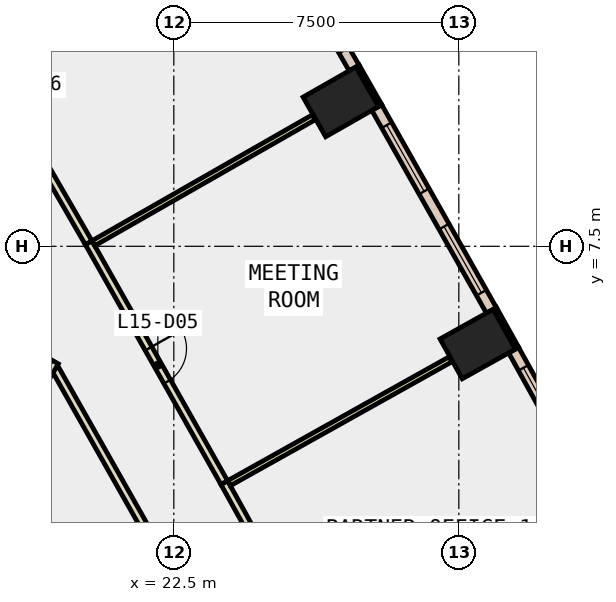
"""IFC4 building model, lengths in metres.
Left out: names, types, materials, properties, quantities, classifications, styles, units other than length and angle.
Written with IfcOpenShell. Run it as: python <this file> out.ifc"""

import sys

from ifc_helpers import new_model, si_unit, direction, frame, frame_2d, origin, origin_2d, place, context, subcontext, project, spatial, rectangle, extrude, element, fill, save


model = new_model("IFC4")
c1 = context("Model", 3, precision=1e-05, world=origin(), true_north=direction((0.0, 1.0)))
c2 = subcontext(c1, "Body", "Model", "MODEL_VIEW")
j1 = project(units=[si_unit("LENGTHUNIT", "METRE"), si_unit("PLANEANGLEUNIT", "RADIAN")], contexts=[c1])
p1 = place(None, origin())
s1 = spatial("IfcSite", under=j1, at=p1, CompositionType="ELEMENT")
p2 = place(p1, origin())
s2 = spatial("IfcBuilding", under=s1, at=p2, CompositionType="ELEMENT")
p3 = place(p2, frame((0.0, 0.0, 72.8)))
s3 = spatial("IfcBuildingStorey", under=s2, at=p3, CompositionType="ELEMENT", Elevation=72.8)
for number, where, z_axis, x_axis in (
    (1, (30.497, 4.928, -0.4), (0.0, 0.0, 1.0), (-0.487, 0.873, 0.0)),
    (2, (26.894, 11.301, -0.4), (0.0, 0.0, 1.0), (-0.496, 0.869, 0.0)),
):
    element("IfcColumn", number, at=place(p3, frame(where, z_axis=z_axis, x_axis=x_axis)), inside=s3, PredefinedType="COLUMN", context=c2, shape_type="SweptSolid", body=[
        extrude(rectangle(XDim=1.2, YDim=1.6, at=origin_2d()), origin(), (0.0, 0.0, 1.0), 4.2),
    ])
p4 = place(p3, frame((31.531, 4.818, 0.0), z_axis=(0.0, 0.0, 1.0), x_axis=(-0.486817526853, 0.873503689488, 0.0)))
e3 = element("IfcWall", 3, at=p4, inside=s3, PredefinedType="STANDARD", context=c2, shape_type="SweptSolid", body=[
    extrude(rectangle(XDim=1.2, YDim=0.1, at=frame_2d((0.6, 0.0))), origin(), (0.0, 0.0, 1.0), 3.8),
])
p5 = place(p3, frame((27.93, 11.201, 0.0), z_axis=(0.0, 0.0, 1.0), x_axis=(-0.495854054996, 0.868405870629, 0.0)))
e4 = element("IfcWall", 4, at=p5, inside=s3, PredefinedType="STANDARD", context=c2, shape_type="SweptSolid", body=[
    extrude(rectangle(XDim=1.2, YDim=0.1, at=frame_2d((0.6, 0.0))), origin(), (0.0, 0.0, 1.0), 3.8),
])
p6 = place(p3, frame((34.409, -0.595, 0.0), z_axis=(0.0, 0.0, 1.0), x_axis=(-0.484025698618, 0.875053782963, 0.0)))
e5 = element("IfcWall", 5, at=p6, inside=s3, PredefinedType="STANDARD", context=c2, shape_type="SweptSolid", body=[
    extrude(rectangle(XDim=6.13, YDim=0.3, at=frame_2d((3.065, 0.0))), origin(), (0.0, 0.0, 1.0), 3.8),
])
p7 = place(p6, frame((0.532, 0.0, 0.9)))
e6 = element("IfcOpeningElement", 6, at=p7, cuts=e5, PredefinedType="OPENING", context=c2, shape_type="SweptSolid", body=[
    extrude(rectangle(XDim=2.0, YDim=2.6, at=frame_2d((1.0, 1.3))), frame((0.0, 0.16, 0.0), z_axis=(0.0, -1.0, 0.0), x_axis=(1.0, 0.0, 0.0)), (0.0, 0.0, 1.0), 0.32),
])
p8 = place(p6, frame((3.597, 0.0, 0.9)))
e7 = element("IfcOpeningElement", 7, at=p8, cuts=e5, PredefinedType="OPENING", context=c2, shape_type="SweptSolid", body=[
    extrude(rectangle(XDim=2.0, YDim=2.6, at=frame_2d((1.0, 1.3))), frame((0.0, 0.16, 0.0), z_axis=(0.0, -1.0, 0.0), x_axis=(1.0, 0.0, 0.0)), (0.0, 0.0, 1.0), 0.32),
])
p9 = place(p3, frame((30.857, 5.814, 0.0), z_axis=(0.0, 0.0, 1.0), x_axis=(-0.492097935349, 0.870539845168, 0.0)))
e8 = element("IfcWall", 8, at=p9, inside=s3, PredefinedType="STANDARD", context=c2, shape_type="SweptSolid", body=[
    extrude(rectangle(XDim=6.131, YDim=0.3, at=frame_2d((3.065, 0.0))), origin(), (0.0, 0.0, 1.0), 3.8),
])
p10 = place(p9, frame((0.533, 0.0, 0.9)))
e9 = element("IfcOpeningElement", 9, at=p10, cuts=e8, PredefinedType="OPENING", context=c2, shape_type="SweptSolid", body=[
    extrude(rectangle(XDim=2.0, YDim=2.6, at=frame_2d((1.0, 1.3))), frame((0.0, 0.16, 0.0), z_axis=(0.0, -1.0, 0.0), x_axis=(1.0, 0.0, 0.0)), (0.0, 0.0, 1.0), 0.32),
])
p11 = place(p9, frame((3.598, 0.0, 0.9)))
e10 = element("IfcOpeningElement", 10, at=p11, cuts=e8, PredefinedType="OPENING", context=c2, shape_type="SweptSolid", body=[
    extrude(rectangle(XDim=2.0, YDim=2.6, at=frame_2d((1.0, 1.3))), frame((0.0, 0.16, 0.0), z_axis=(0.0, -1.0, 0.0), x_axis=(1.0, 0.0, 0.0)), (0.0, 0.0, 1.0), 0.32),
])
p12 = place(p3, frame((27.246, 12.191, 0.0), z_axis=(0.0, 0.0, 1.0), x_axis=(-0.499998239139, 0.866026420416, 0.0)))
e11 = element("IfcWall", 11, at=p12, inside=s3, PredefinedType="STANDARD", context=c2, shape_type="SweptSolid", body=[
    extrude(rectangle(XDim=6.13, YDim=0.3, at=frame_2d((3.065, 0.0))), origin(), (0.0, 0.0, 1.0), 3.8),
])
p13 = place(p12, frame((0.533, 0.0, 0.9)))
e12 = element("IfcOpeningElement", 12, at=p13, cuts=e11, PredefinedType="OPENING", context=c2, shape_type="SweptSolid", body=[
    extrude(rectangle(XDim=2.0, YDim=2.6, at=frame_2d((1.0, 1.3))), frame((0.0, 0.16, 0.0), z_axis=(0.0, -1.0, 0.0), x_axis=(1.0, 0.0, 0.0)), (0.0, 0.0, 1.0), 0.32),
])
p14 = place(p12, frame((3.598, 0.0, 0.9)))
e13 = element("IfcOpeningElement", 13, at=p14, cuts=e11, PredefinedType="OPENING", context=c2, shape_type="SweptSolid", body=[
    extrude(rectangle(XDim=2.0, YDim=2.6, at=frame_2d((1.0, 1.3))), frame((0.0, 0.16, 0.0), z_axis=(0.0, -1.0, 0.0), x_axis=(1.0, 0.0, 0.0)), (0.0, 0.0, 1.0), 0.32),
])
p15 = place(p3, frame((21.77, 0.046, 0.0), z_axis=(0.0, 0.0, 1.0), x_axis=(-0.492148137455, 0.870511465059, 0.0)))
e14 = element("IfcWall", 14, at=p15, inside=s3, PredefinedType="PARTITIONING", context=c2, shape_type="SweptSolid", body=[
    extrude(rectangle(XDim=4.868, YDim=0.2, at=frame_2d((2.434, 0.0))), origin(), (0.0, 0.0, 1.0), 3.8),
])
p16 = place(p3, frame((23.828, 1.283, 0.0), z_axis=(0.0, 0.0, 1.0), x_axis=(0.484064127728, -0.875032525251, 0.0)))
e15 = element("IfcWall", 15, at=p16, inside=s3, PredefinedType="PARTITIONING", context=c2, shape_type="SweptSolid", body=[
    extrude(rectangle(XDim=7.251, YDim=0.2, at=frame_2d((3.625, 0.0))), origin(), (0.0, 0.0, 1.0), 3.8),
])
p17 = place(p16, frame((3.201, 0.0, 0.0)))
e16 = element("IfcOpeningElement", 16, at=p17, cuts=e15, PredefinedType="OPENING", context=c2, shape_type="SweptSolid", body=[
    extrude(rectangle(XDim=1.0, YDim=2.1, at=frame_2d((0.5, 1.05))), frame((0.0, 0.11, 0.0), z_axis=(0.0, -1.0, 0.0), x_axis=(1.0, 0.0, 0.0)), (0.0, 0.0, 1.0), 0.22),
])
p18 = place(p3, frame((20.259, 7.596, 0.0), z_axis=(0.0, 0.0, 1.0), x_axis=(0.492021755503, -0.870582903641, 0.0)))
e17 = element("IfcWall", 17, at=p18, inside=s3, PredefinedType="PARTITIONING", context=c2, shape_type="SweptSolid", body=[
    extrude(rectangle(XDim=7.251, YDim=0.2, at=frame_2d((3.626, 0.0))), origin(), (0.0, 0.0, 1.0), 3.8),
])
p19 = place(p18, frame((3.201, 0.0, 0.0)))
e18 = element("IfcOpeningElement", 18, at=p19, cuts=e17, PredefinedType="OPENING", context=c2, shape_type="SweptSolid", body=[
    extrude(rectangle(XDim=1.0, YDim=2.1, at=frame_2d((0.5, 1.05))), frame((0.0, 0.11, 0.0), z_axis=(0.0, -1.0, 0.0), x_axis=(1.0, 0.0, 0.0)), (0.0, 0.0, 1.0), 0.22),
])
p20 = place(p3, frame((16.669, 13.811, 0.0), z_axis=(0.0, 0.0, 1.0), x_axis=(0.500027672765, -0.866009426316, 0.0)))
e19 = element("IfcWall", 19, at=p20, inside=s3, PredefinedType="PARTITIONING", context=c2, shape_type="SweptSolid", body=[
    extrude(rectangle(XDim=7.178, YDim=0.2, at=frame_2d((3.589, 0.0))), origin(), (0.0, 0.0, 1.0), 3.8),
])
p21 = place(p20, frame((3.164, 0.0, 0.0)))
e20 = element("IfcOpeningElement", 20, at=p21, cuts=e19, PredefinedType="OPENING", context=c2, shape_type="SweptSolid", body=[
    extrude(rectangle(XDim=1.0, YDim=2.1, at=frame_2d((0.5, 1.05))), frame((0.0, 0.11, 0.0), z_axis=(0.0, -1.0, 0.0), x_axis=(1.0, 0.0, 0.0)), (0.0, 0.0, 1.0), 0.22),
])
p22 = place(p3, frame((19.374, 4.458, 0.0), z_axis=(0.0, 0.0, 1.0), x_axis=(-0.499973880856, -0.866040483154, 0.0)))
e21 = element("IfcWall", 21, at=p22, inside=s3, PredefinedType="PARTITIONING", context=c2, shape_type="SweptSolid", body=[
    extrude(rectangle(XDim=13.113, YDim=0.2, at=frame_2d((6.556, 0.0))), origin(), (0.0, 0.0, 1.0), 3.8),
])
p23 = place(p3, frame((23.951, 1.266, 0.0), z_axis=(0.0, 0.0, 1.0), x_axis=(0.872786908026, 0.488101437385, 0.0)))
e22 = element("IfcWall", 22, at=p23, inside=s3, PredefinedType="PARTITIONING", context=c2, shape_type="SweptSolid", body=[
    extrude(rectangle(XDim=6.681, YDim=0.15, at=frame_2d((3.34, 0.0))), origin(), (0.0, 0.0, 1.0), 3.8),
])
p24 = place(p3, frame((20.382, 7.58, 0.0), z_axis=(0.0, 0.0, 1.0), x_axis=(0.868256636797, 0.496115321935, 0.0)))
e23 = element("IfcWall", 23, at=p24, inside=s3, PredefinedType="PARTITIONING", context=c2, shape_type="SweptSolid", body=[
    extrude(rectangle(XDim=6.68, YDim=0.15, at=frame_2d((3.34, 0.0))), origin(), (0.0, 0.0, 1.0), 3.8),
])
p25 = place(p8, origin())
e24 = element("IfcWindow", 24, at=p25, inside=s3, PartitioningType="SINGLE_PANEL", PredefinedType="WINDOW", context=c2, shape_type="SweptSolid", body=[
    extrude(rectangle(XDim=2.0, YDim=2.6, at=frame_2d((1.0, 1.3))), frame((0.0, 0.03, 0.0), z_axis=(0.0, -1.0, 0.0), x_axis=(1.0, 0.0, 0.0)), (0.0, 0.0, 1.0), 0.06),
])
fill(e7, e24)
p26 = place(p10, origin())
e25 = element("IfcWindow", 25, at=p26, inside=s3, PartitioningType="SINGLE_PANEL", PredefinedType="WINDOW", context=c2, shape_type="SweptSolid", body=[
    extrude(rectangle(XDim=2.0, YDim=2.6, at=frame_2d((1.0, 1.3))), frame((0.0, 0.03, 0.0), z_axis=(0.0, -1.0, 0.0), x_axis=(1.0, 0.0, 0.0)), (0.0, 0.0, 1.0), 0.06),
])
fill(e9, e25)
p27 = place(p11, origin())
e26 = element("IfcWindow", 26, at=p27, inside=s3, PartitioningType="SINGLE_PANEL", PredefinedType="WINDOW", context=c2, shape_type="SweptSolid", body=[
    extrude(rectangle(XDim=2.0, YDim=2.6, at=frame_2d((1.0, 1.3))), frame((0.0, 0.03, 0.0), z_axis=(0.0, -1.0, 0.0), x_axis=(1.0, 0.0, 0.0)), (0.0, 0.0, 1.0), 0.06),
])
fill(e10, e26)
p28 = place(p19, origin())
e27 = element("IfcDoor", 27, at=p28, inside=s3, OperationType="SINGLE_SWING_LEFT", PredefinedType="DOOR", context=c2, shape_type="SweptSolid", body=[
    extrude(rectangle(XDim=1.0, YDim=2.1, at=frame_2d((0.5, 1.05))), frame((0.0, 0.025, 0.0), z_axis=(0.0, -1.0, 0.0), x_axis=(1.0, 0.0, 0.0)), (0.0, 0.0, 1.0), 0.05),
])
fill(e18, e27)
save(model, sys.argv[1])
